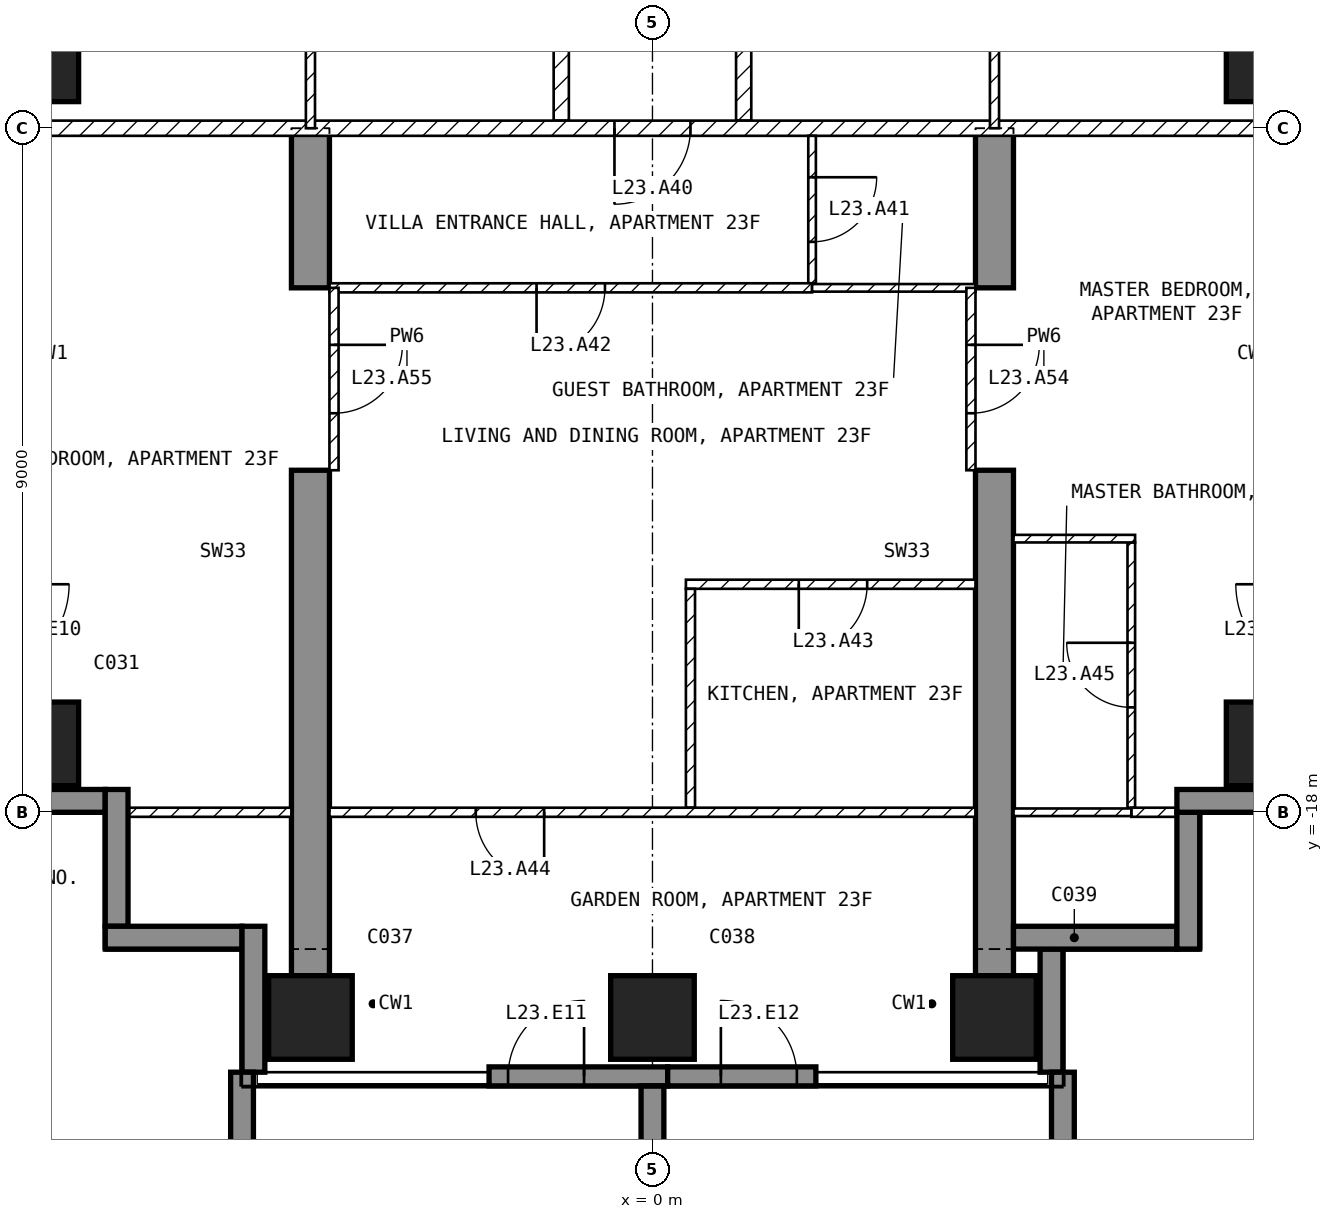
"""IFC4 building model, lengths in metres.
Left out: names, types, materials, properties, quantities, classifications, styles, units other than length and angle.
Written with IfcOpenShell. Run it as: python <this file> out.ifc"""

import sys

from ifc_helpers import new_model, si_unit, direction, frame, frame_2d, origin, origin_2d, place, context, subcontext, project, spatial, polyline, rectangle, outline, extrude, element, fill, save


model = new_model("IFC4")
c1 = context("Model", 3, precision=1e-05, world=origin(), true_north=direction((0.0, 1.0)))
c2 = subcontext(c1, "Body", "Model", "MODEL_VIEW")
j1 = project(units=[si_unit("LENGTHUNIT", "METRE"), si_unit("PLANEANGLEUNIT", "RADIAN")], contexts=[c1])
p1 = place(None, origin())
s1 = spatial("IfcSite", under=j1, at=p1, CompositionType="ELEMENT")
p2 = place(p1, origin())
s2 = spatial("IfcBuilding", under=s1, at=p2, CompositionType="ELEMENT")
p3 = place(p2, frame((0.0, 0.0, 102.4)))
s3 = spatial("IfcBuildingStorey", under=s2, at=p3, CompositionType="ELEMENT", Elevation=102.4)
for number, where, z_axis, x_axis in (
    (1, (-8.1, -17.1, -0.25), (0.0, 0.0, 1.0), (1.0, 0.0, 0.0)),
    (2, (-8.1, -8.1, -0.25), (0.0, 0.0, 1.0), (1.0, 0.0, 0.0)),
    (3, (-4.5, -20.7, -0.25), (0.0, 0.0, 1.0), (1.0, 0.0, 0.0)),
    (4, (0.0, -20.7, -0.25), (0.0, 0.0, 1.0), (1.0, 0.0, 0.0)),
    (5, (4.5, -20.7, -0.25), (0.0, 0.0, 1.0), (1.0, 0.0, 0.0)),
    (6, (8.1, -17.1, -0.25), (0.0, 0.0, 1.0), (1.0, 0.0, 0.0)),
    (7, (8.1, -8.1, -0.25), (0.0, 0.0, 1.0), (1.0, 0.0, 0.0)),
):
    element("IfcColumn", number, at=place(p3, frame(where, z_axis=z_axis, x_axis=x_axis)), inside=s3, PredefinedType="COLUMN", context=c2, shape_type="SweptSolid", body=[
        extrude(rectangle(XDim=1.1, YDim=1.1, at=origin_2d()), origin(), (0.0, 0.0, 1.0), 3.5),
    ])
for number, where, z_axis, x_axis in (
    (8, (-4.75, -20.15, -0.25), (1.0, 0.0, 0.0), (0.0, 1.0, 0.0)),
    (9, (4.25, -20.15, -0.25), (1.0, 0.0, 0.0), (0.0, 1.0, 0.0)),
):
    element("IfcWall", number, at=place(p3, frame(where, z_axis=z_axis, x_axis=x_axis)), inside=s3, PredefinedType="SHEAR", context=c2, shape_type="SweptSolid", body=[
        extrude(outline(polyline([(0.0, 0.0), (6.65, 0.0), (6.65, 2.65), (9.05, 2.65), (9.05, 0.0), (11.15, 0.0), (11.15, 3.5), (0.0, 3.5), (0.0, 0.0)])), origin(), (0.0, 0.0, 1.0), 0.5),
    ])
p4 = place(p3, frame((-2.15, -21.475, 0.0), z_axis=(0.0, 0.0, 1.0), x_axis=(1.0, 0.0, 0.0)))
e10 = element("IfcWall", 10, at=p4, inside=s3, PredefinedType="SOLIDWALL", context=c2, shape_type="SweptSolid", body=[
    extrude(rectangle(XDim=2.35, YDim=0.25, at=frame_2d((1.175, 0.0))), origin(), (0.0, 0.0, 1.0), 3.25),
])
p5 = place(p4, frame((0.25, 0.0, 0.0)))
e11 = element("IfcOpeningElement", 11, at=p5, cuts=e10, PredefinedType="OPENING", context=c2, shape_type="SweptSolid", body=[
    extrude(rectangle(XDim=1.0, YDim=2.4, at=frame_2d((0.5, 1.2))), frame((0.0, 0.135, 0.0), z_axis=(0.0, -1.0, 0.0), x_axis=(1.0, 0.0, 0.0)), (0.0, 0.0, 1.0), 0.27),
])
p6 = place(p3, frame((0.2, -21.475, 0.0), z_axis=(0.0, 0.0, 1.0), x_axis=(1.0, 0.0, 0.0)))
e12 = element("IfcWall", 12, at=p6, inside=s3, PredefinedType="SOLIDWALL", context=c2, shape_type="SweptSolid", body=[
    extrude(rectangle(XDim=1.95, YDim=0.25, at=frame_2d((0.975, 0.0))), origin(), (0.0, 0.0, 1.0), 3.25),
])
p7 = place(p6, frame((0.7, 0.0, 0.0)))
e13 = element("IfcOpeningElement", 13, at=p7, cuts=e12, PredefinedType="OPENING", context=c2, shape_type="SweptSolid", body=[
    extrude(rectangle(XDim=1.0, YDim=2.4, at=frame_2d((0.5, 1.2))), frame((0.0, 0.135, 0.0), z_axis=(0.0, -1.0, 0.0), x_axis=(1.0, 0.0, 0.0)), (0.0, 0.0, 1.0), 0.27),
])
p8 = place(p3, frame((5.25, -21.42, 0.0), z_axis=(0.0, 0.0, 1.0), x_axis=(0.0, 1.0, 0.0)))
e14 = element("IfcWall", 14, at=p8, inside=s3, PredefinedType="SOLIDWALL", context=c2, shape_type="SweptSolid", body=[
    extrude(rectangle(XDim=1.62, YDim=0.3, at=frame_2d((0.81, 0.0))), origin(), (0.0, 0.0, 1.0), 3.25),
])
p9 = place(p3, frame((4.75, -19.65, 0.0), z_axis=(0.0, 0.0, 1.0), x_axis=(1.0, 0.0, 0.0)))
e15 = element("IfcWall", 15, at=p9, inside=s3, PredefinedType="SOLIDWALL", context=c2, shape_type="SweptSolid", body=[
    extrude(rectangle(XDim=2.15, YDim=0.3, at=frame_2d((1.075, 0.0))), origin(), (0.0, 0.0, 1.0), 3.25),
])
p10 = place(p3, frame((7.05, -19.8, 0.0), z_axis=(0.0, 0.0, 1.0), x_axis=(0.0, 1.0, 0.0)))
e16 = element("IfcWall", 16, at=p10, inside=s3, PredefinedType="SOLIDWALL", context=c2, shape_type="SweptSolid", body=[
    extrude(rectangle(XDim=1.8, YDim=0.3, at=frame_2d((0.9, 0.0))), origin(), (0.0, 0.0, 1.0), 3.25),
])
p11 = place(p3, frame((6.9, -17.85, 0.0), z_axis=(0.0, 0.0, 1.0), x_axis=(1.0, 0.0, 0.0)))
e17 = element("IfcWall", 17, at=p11, inside=s3, PredefinedType="SOLIDWALL", context=c2, shape_type="SweptSolid", body=[
    extrude(rectangle(XDim=1.85, YDim=0.3, at=frame_2d((0.925, 0.0))), origin(), (0.0, 0.0, 1.0), 3.25),
])
p12 = place(p3, frame((-8.75, -17.85, 0.0), z_axis=(0.0, 0.0, 1.0), x_axis=(1.0, 0.0, 0.0)))
e18 = element("IfcWall", 18, at=p12, inside=s3, PredefinedType="SOLIDWALL", context=c2, shape_type="SweptSolid", body=[
    extrude(rectangle(XDim=1.55, YDim=0.3, at=frame_2d((0.775, 0.0))), origin(), (0.0, 0.0, 1.0), 3.25),
])
for number, where, z_axis, x_axis in (
    (19, (-7.05, -17.7, 0.0), (0.0, 0.0, 1.0), (0.0, -1.0, 0.0)),
    (20, (-7.2, -19.65, 0.0), (0.0, 0.0, 1.0), (1.0, 0.0, 0.0)),
):
    element("IfcWall", number, at=place(p3, frame(where, z_axis=z_axis, x_axis=x_axis)), inside=s3, PredefinedType="SOLIDWALL", context=c2, shape_type="SweptSolid", body=[
        extrude(rectangle(XDim=1.8, YDim=0.3, at=frame_2d((0.9, 0.0))), origin(), (0.0, 0.0, 1.0), 3.25),
    ])
p13 = place(p3, frame((-5.25, -19.5, 0.0), z_axis=(0.0, 0.0, 1.0), x_axis=(0.0, -1.0, 0.0)))
e21 = element("IfcWall", 21, at=p13, inside=s3, PredefinedType="SOLIDWALL", context=c2, shape_type="SweptSolid", body=[
    extrude(rectangle(XDim=1.92, YDim=0.3, at=frame_2d((0.96, 0.0))), origin(), (0.0, 0.0, 1.0), 3.25),
])
p14 = place(p3, frame((-5.4, -21.42, 0.0), z_axis=(0.0, 0.0, 1.0), x_axis=(0.0, -1.0, 0.0)))
e22 = element("IfcWall", 22, at=p14, inside=s3, PredefinedType="SOLIDWALL", context=c2, shape_type="SweptSolid", body=[
    extrude(rectangle(XDim=2.88, YDim=0.3, at=frame_2d((1.44, 0.0))), origin(), (0.0, 0.0, 1.0), 3.25),
])
p15 = place(p3, frame((0.0, -21.6, 0.0), z_axis=(0.0, 0.0, 1.0), x_axis=(0.0, -1.0, 0.0)))
e23 = element("IfcWall", 23, at=p15, inside=s3, PredefinedType="SOLIDWALL", context=c2, shape_type="SweptSolid", body=[
    extrude(rectangle(XDim=2.7, YDim=0.3, at=frame_2d((1.35, 0.0))), origin(), (0.0, 0.0, 1.0), 3.25),
])
p16 = place(p3, frame((5.4, -21.42, 0.0), z_axis=(0.0, 0.0, 1.0), x_axis=(0.0, -1.0, 0.0)))
e24 = element("IfcWall", 24, at=p16, inside=s3, PredefinedType="SOLIDWALL", context=c2, shape_type="SweptSolid", body=[
    extrude(rectangle(XDim=2.88, YDim=0.3, at=frame_2d((1.44, 0.0))), origin(), (0.0, 0.0, 1.0), 3.25),
])
for number, where, z_axis, x_axis in (
    (25, (1.2, -4.6, 0.0), (0.0, 0.0, 1.0), (0.0, -1.0, 0.0)),
    (26, (-1.2, -8.9, 0.0), (0.0, 0.0, 1.0), (0.0, 1.0, 0.0)),
):
    element("IfcWall", number, at=place(p3, frame(where, z_axis=z_axis, x_axis=x_axis)), inside=s3, PredefinedType="PARTITIONING", context=c2, shape_type="SweptSolid", body=[
        extrude(rectangle(XDim=4.3, YDim=0.2, at=frame_2d((2.15, 0.0))), origin(), (0.0, 0.0, 1.0), 3.25),
    ])
p17 = place(p3, frame((8.92, -9.0, 0.0), z_axis=(0.0, 0.0, 1.0), x_axis=(-1.0, 0.0, 0.0)))
e27 = element("IfcWall", 27, at=p17, inside=s3, PredefinedType="PARTITIONING", context=c2, shape_type="SweptSolid", body=[
    extrude(rectangle(XDim=17.84, YDim=0.2, at=frame_2d((8.92, 0.0))), origin(), (0.0, 0.0, 1.0), 3.25),
])
p18 = place(p17, frame((8.42, 0.0, 0.0)))
e28 = element("IfcOpeningElement", 28, at=p18, cuts=e27, PredefinedType="OPENING", context=c2, shape_type="SweptSolid", body=[
    extrude(rectangle(XDim=1.0, YDim=2.1, at=frame_2d((0.5, 1.05))), frame((0.0, 0.11, 0.0), z_axis=(0.0, -1.0, 0.0), x_axis=(1.0, 0.0, 0.0)), (0.0, 0.0, 1.0), 0.22),
])
p19 = place(p3, frame((4.5, -9.0, 0.0), z_axis=(0.0, 0.0, 1.0), x_axis=(0.0, 1.0, 0.0)))
e29 = element("IfcWall", 29, at=p19, inside=s3, PredefinedType="PARTITIONING", context=c2, shape_type="SweptSolid", body=[
    extrude(rectangle(XDim=4.5, YDim=0.12, at=frame_2d((2.25, 0.0))), origin(), (0.0, 0.0, 1.0), 3.25),
])
p20 = place(p19, frame((1.8, 0.0, 0.0)))
e30 = element("IfcOpeningElement", 30, at=p20, cuts=e29, PredefinedType="OPENING", context=c2, shape_type="SweptSolid", body=[
    extrude(rectangle(XDim=0.9, YDim=2.1, at=frame_2d((0.45, 1.05))), frame((0.0, 0.07, 0.0), z_axis=(0.0, -1.0, 0.0), x_axis=(1.0, 0.0, 0.0)), (0.0, 0.0, 1.0), 0.14),
])
p21 = place(p3, frame((-4.5, -4.5, 0.0), z_axis=(0.0, 0.0, 1.0), x_axis=(0.0, -1.0, 0.0)))
e31 = element("IfcWall", 31, at=p21, inside=s3, PredefinedType="PARTITIONING", context=c2, shape_type="SweptSolid", body=[
    extrude(rectangle(XDim=4.5, YDim=0.12, at=frame_2d((2.25, 0.0))), origin(), (0.0, 0.0, 1.0), 3.25),
])
p22 = place(p21, frame((1.8, 0.0, 0.0)))
e32 = element("IfcOpeningElement", 32, at=p22, cuts=e31, PredefinedType="OPENING", context=c2, shape_type="SweptSolid", body=[
    extrude(rectangle(XDim=0.9, YDim=2.1, at=frame_2d((0.45, 1.05))), frame((0.0, 0.07, 0.0), z_axis=(0.0, -1.0, 0.0), x_axis=(1.0, 0.0, 0.0)), (0.0, 0.0, 1.0), 0.14),
])
p23 = place(p3, frame((2.1, -9.1, 0.0), z_axis=(0.0, 0.0, 1.0), x_axis=(0.0, -1.0, 0.0)))
e33 = element("IfcWall", 33, at=p23, inside=s3, PredefinedType="PARTITIONING", context=c2, shape_type="SweptSolid", body=[
    extrude(rectangle(XDim=1.94, YDim=0.1, at=frame_2d((0.97, 0.0))), origin(), (0.0, 0.0, 1.0), 3.25),
])
p24 = place(p23, frame((0.545, 0.0, 0.0)))
e34 = element("IfcOpeningElement", 34, at=p24, cuts=e33, PredefinedType="OPENING", context=c2, shape_type="SweptSolid", body=[
    extrude(rectangle(XDim=0.85, YDim=2.1, at=frame_2d((0.425, 1.05))), frame((0.0, 0.06, 0.0), z_axis=(0.0, -1.0, 0.0), x_axis=(1.0, 0.0, 0.0)), (0.0, 0.0, 1.0), 0.12),
])
p25 = place(p3, frame((2.1, -11.1, 0.0), z_axis=(0.0, 0.0, 1.0), x_axis=(-1.0, 0.0, 0.0)))
e35 = element("IfcWall", 35, at=p25, inside=s3, PredefinedType="PARTITIONING", context=c2, shape_type="SweptSolid", body=[
    extrude(rectangle(XDim=6.35, YDim=0.12, at=frame_2d((3.175, 0.0))), origin(), (0.0, 0.0, 1.0), 3.25),
])
p26 = place(p25, frame((2.725, 0.0, 0.0)))
e36 = element("IfcOpeningElement", 36, at=p26, cuts=e35, PredefinedType="OPENING", context=c2, shape_type="SweptSolid", body=[
    extrude(rectangle(XDim=0.9, YDim=2.1, at=frame_2d((0.45, 1.05))), frame((0.0, 0.07, 0.0), z_axis=(0.0, -1.0, 0.0), x_axis=(1.0, 0.0, 0.0)), (0.0, 0.0, 1.0), 0.14),
])
p27 = place(p3, frame((4.25, -11.1, 0.0), z_axis=(0.0, 0.0, 1.0), x_axis=(-1.0, 0.0, 0.0)))
e37 = element("IfcWall", 37, at=p27, inside=s3, PredefinedType="PARTITIONING", context=c2, shape_type="SweptSolid", body=[
    extrude(rectangle(XDim=2.15, YDim=0.1, at=frame_2d((1.075, 0.0))), origin(), (0.0, 0.0, 1.0), 3.25),
])
p28 = place(p3, frame((4.25, -15.0, 0.0), z_axis=(0.0, 0.0, 1.0), x_axis=(-1.0, 0.0, 0.0)))
e38 = element("IfcWall", 38, at=p28, inside=s3, PredefinedType="PARTITIONING", context=c2, shape_type="SweptSolid", body=[
    extrude(rectangle(XDim=3.81, YDim=0.12, at=frame_2d((1.905, 0.0))), origin(), (0.0, 0.0, 1.0), 3.25),
])
p29 = place(p28, frame((1.425, 0.0, 0.0)))
e39 = element("IfcOpeningElement", 39, at=p29, cuts=e38, PredefinedType="OPENING", context=c2, shape_type="SweptSolid", body=[
    extrude(rectangle(XDim=0.9, YDim=2.1, at=frame_2d((0.45, 1.05))), frame((0.0, 0.07, 0.0), z_axis=(0.0, -1.0, 0.0), x_axis=(1.0, 0.0, 0.0)), (0.0, 0.0, 1.0), 0.14),
])
p30 = place(p3, frame((0.5, -15.06, 0.0), z_axis=(0.0, 0.0, 1.0), x_axis=(0.0, -1.0, 0.0)))
e40 = element("IfcWall", 40, at=p30, inside=s3, PredefinedType="PARTITIONING", context=c2, shape_type="SweptSolid", body=[
    extrude(rectangle(XDim=2.88, YDim=0.12, at=frame_2d((1.44, 0.0))), origin(), (0.0, 0.0, 1.0), 3.25),
])
p31 = place(p3, frame((4.25, -18.0, 0.0), z_axis=(0.0, 0.0, 1.0), x_axis=(-1.0, 0.0, 0.0)))
e41 = element("IfcWall", 41, at=p31, inside=s3, PredefinedType="PARTITIONING", context=c2, shape_type="SweptSolid", body=[
    extrude(rectangle(XDim=8.5, YDim=0.12, at=frame_2d((4.25, 0.0))), origin(), (0.0, 0.0, 1.0), 3.25),
])
p32 = place(p31, frame((5.675, 0.0, 0.0)))
e42 = element("IfcOpeningElement", 42, at=p32, cuts=e41, PredefinedType="OPENING", context=c2, shape_type="SweptSolid", body=[
    extrude(rectangle(XDim=0.9, YDim=2.1, at=frame_2d((0.45, 1.05))), frame((0.0, 0.07, 0.0), z_axis=(0.0, -1.0, 0.0), x_axis=(1.0, 0.0, 0.0)), (0.0, 0.0, 1.0), 0.14),
])
p33 = place(p3, frame((6.3, -17.94, 0.0), z_axis=(0.0, 0.0, 1.0), x_axis=(0.0, 1.0, 0.0)))
e43 = element("IfcWall", 43, at=p33, inside=s3, PredefinedType="PARTITIONING", context=c2, shape_type="SweptSolid", body=[
    extrude(rectangle(XDim=3.49, YDim=0.1, at=frame_2d((1.745, 0.0))), origin(), (0.0, 0.0, 1.0), 3.25),
])
p34 = place(p33, frame((1.32, 0.0, 0.0)))
e44 = element("IfcOpeningElement", 44, at=p34, cuts=e43, PredefinedType="OPENING", context=c2, shape_type="SweptSolid", body=[
    extrude(rectangle(XDim=0.85, YDim=2.1, at=frame_2d((0.425, 1.05))), frame((0.0, 0.06, 0.0), z_axis=(0.0, -1.0, 0.0), x_axis=(1.0, 0.0, 0.0)), (0.0, 0.0, 1.0), 0.12),
])
p35 = place(p3, frame((6.35, -14.4, 0.0), z_axis=(0.0, 0.0, 1.0), x_axis=(-1.0, 0.0, 0.0)))
e45 = element("IfcWall", 45, at=p35, inside=s3, PredefinedType="PARTITIONING", context=c2, shape_type="SweptSolid", body=[
    extrude(rectangle(XDim=1.6, YDim=0.1, at=frame_2d((0.8, 0.0))), origin(), (0.0, 0.0, 1.0), 3.25),
])
p36 = place(p3, frame((7.12, -18.0, 0.0), z_axis=(0.0, 0.0, 1.0), x_axis=(-1.0, 0.0, 0.0)))
e46 = element("IfcWall", 46, at=p36, inside=s3, PredefinedType="PARTITIONING", context=c2, shape_type="SweptSolid", body=[
    extrude(rectangle(XDim=0.82, YDim=0.12, at=frame_2d((0.41, 0.0))), origin(), (0.0, 0.0, 1.0), 3.25),
])
p37 = place(p3, frame((6.3, -18.0, 0.0), z_axis=(0.0, 0.0, 1.0), x_axis=(-1.0, 0.0, 0.0)))
e47 = element("IfcWall", 47, at=p37, inside=s3, PredefinedType="PARTITIONING", context=c2, shape_type="SweptSolid", body=[
    extrude(rectangle(XDim=1.55, YDim=0.1, at=frame_2d((0.775, 0.0))), origin(), (0.0, 0.0, 1.0), 3.25),
])
p38 = place(p3, frame((-4.75, -18.0, 0.0), z_axis=(0.0, 0.0, 1.0), x_axis=(-1.0, 0.0, 0.0)))
e48 = element("IfcWall", 48, at=p38, inside=s3, PredefinedType="PARTITIONING", context=c2, shape_type="SweptSolid", body=[
    extrude(rectangle(XDim=2.37, YDim=0.12, at=frame_2d((1.185, 0.0))), origin(), (0.0, 0.0, 1.0), 3.25),
])
p39 = place(p3, frame((4.19, -11.1, 0.0), z_axis=(0.0, 0.0, 1.0), x_axis=(0.0, -1.0, 0.0)))
e49 = element("IfcWall", 49, at=p39, inside=s3, PredefinedType="PARTITIONING", context=c2, shape_type="SweptSolid", body=[
    extrude(rectangle(XDim=2.4, YDim=0.12, at=frame_2d((1.2, 0.0))), origin(), (0.0, 0.0, 1.0), 2.4),
])
p40 = place(p39, frame((0.75, 0.0, 0.0)))
e50 = element("IfcOpeningElement", 50, at=p40, cuts=e49, PredefinedType="OPENING", context=c2, shape_type="SweptSolid", body=[
    extrude(rectangle(XDim=0.9, YDim=2.1, at=frame_2d((0.45, 1.05))), frame((0.0, 0.07, 0.0), z_axis=(0.0, -1.0, 0.0), x_axis=(1.0, 0.0, 0.0)), (0.0, 0.0, 1.0), 0.14),
])
p41 = place(p3, frame((-4.19, -11.1, 0.0), z_axis=(0.0, 0.0, 1.0), x_axis=(0.0, -1.0, 0.0)))
e51 = element("IfcWall", 51, at=p41, inside=s3, PredefinedType="PARTITIONING", context=c2, shape_type="SweptSolid", body=[
    extrude(rectangle(XDim=2.4, YDim=0.12, at=frame_2d((1.2, 0.0))), origin(), (0.0, 0.0, 1.0), 2.4),
])
p42 = place(p41, frame((0.75, 0.0, 0.0)))
e52 = element("IfcOpeningElement", 52, at=p42, cuts=e51, PredefinedType="OPENING", context=c2, shape_type="SweptSolid", body=[
    extrude(rectangle(XDim=0.9, YDim=2.1, at=frame_2d((0.45, 1.05))), frame((0.0, 0.07, 0.0), z_axis=(0.0, -1.0, 0.0), x_axis=(1.0, 0.0, 0.0)), (0.0, 0.0, 1.0), 0.14),
])
p43 = place(p5, origin())
e53 = element("IfcDoor", 53, at=p43, inside=s3, OperationType="SINGLE_SWING_RIGHT", PredefinedType="DOOR", context=c2, shape_type="SweptSolid", body=[
    extrude(rectangle(XDim=1.0, YDim=2.4, at=frame_2d((0.5, 1.2))), frame((0.0, 0.025, 0.0), z_axis=(0.0, -1.0, 0.0), x_axis=(1.0, 0.0, 0.0)), (0.0, 0.0, 1.0), 0.05),
])
fill(e11, e53)
p44 = place(p7, origin())
e54 = element("IfcDoor", 54, at=p44, inside=s3, OperationType="SINGLE_SWING_LEFT", PredefinedType="DOOR", context=c2, shape_type="SweptSolid", body=[
    extrude(rectangle(XDim=1.0, YDim=2.4, at=frame_2d((0.5, 1.2))), frame((0.0, 0.025, 0.0), z_axis=(0.0, -1.0, 0.0), x_axis=(1.0, 0.0, 0.0)), (0.0, 0.0, 1.0), 0.05),
])
fill(e13, e54)
p45 = place(p18, origin())
e55 = element("IfcDoor", 55, at=p45, inside=s3, OperationType="SINGLE_SWING_RIGHT", PredefinedType="DOOR", context=c2, shape_type="SweptSolid", body=[
    extrude(rectangle(XDim=1.0, YDim=2.1, at=frame_2d((0.5, 1.05))), frame((0.0, 0.025, 0.0), z_axis=(0.0, -1.0, 0.0), x_axis=(1.0, 0.0, 0.0)), (0.0, 0.0, 1.0), 0.05),
])
fill(e28, e55)
p46 = place(p24, origin())
e56 = element("IfcDoor", 56, at=p46, inside=s3, OperationType="SINGLE_SWING_LEFT", PredefinedType="DOOR", context=c2, shape_type="SweptSolid", body=[
    extrude(rectangle(XDim=0.85, YDim=2.1, at=frame_2d((0.425, 1.05))), frame((0.0, 0.025, 0.0), z_axis=(0.0, -1.0, 0.0), x_axis=(1.0, 0.0, 0.0)), (0.0, 0.0, 1.0), 0.05),
])
fill(e34, e56)
p47 = place(p26, origin())
e57 = element("IfcDoor", 57, at=p47, inside=s3, OperationType="SINGLE_SWING_RIGHT", PredefinedType="DOOR", context=c2, shape_type="SweptSolid", body=[
    extrude(rectangle(XDim=0.9, YDim=2.1, at=frame_2d((0.45, 1.05))), frame((0.0, 0.025, 0.0), z_axis=(0.0, -1.0, 0.0), x_axis=(1.0, 0.0, 0.0)), (0.0, 0.0, 1.0), 0.05),
])
fill(e36, e57)
p48 = place(p29, origin())
e58 = element("IfcDoor", 58, at=p48, inside=s3, OperationType="SINGLE_SWING_RIGHT", PredefinedType="DOOR", context=c2, shape_type="SweptSolid", body=[
    extrude(rectangle(XDim=0.9, YDim=2.1, at=frame_2d((0.45, 1.05))), frame((0.0, 0.025, 0.0), z_axis=(0.0, -1.0, 0.0), x_axis=(1.0, 0.0, 0.0)), (0.0, 0.0, 1.0), 0.05),
])
fill(e39, e58)
p49 = place(p32, origin())
e59 = element("IfcDoor", 59, at=p49, inside=s3, OperationType="SINGLE_SWING_LEFT", PredefinedType="DOOR", context=c2, shape_type="SweptSolid", body=[
    extrude(rectangle(XDim=0.9, YDim=2.1, at=frame_2d((0.45, 1.05))), frame((0.0, 0.025, 0.0), z_axis=(0.0, -1.0, 0.0), x_axis=(1.0, 0.0, 0.0)), (0.0, 0.0, 1.0), 0.05),
])
fill(e42, e59)
p50 = place(p34, origin())
e60 = element("IfcDoor", 60, at=p50, inside=s3, OperationType="SINGLE_SWING_RIGHT", PredefinedType="DOOR", context=c2, shape_type="SweptSolid", body=[
    extrude(rectangle(XDim=0.85, YDim=2.1, at=frame_2d((0.425, 1.05))), frame((0.0, 0.025, 0.0), z_axis=(0.0, -1.0, 0.0), x_axis=(1.0, 0.0, 0.0)), (0.0, 0.0, 1.0), 0.05),
])
fill(e44, e60)
p51 = place(p40, origin())
e61 = element("IfcDoor", 61, at=p51, inside=s3, OperationType="SINGLE_SWING_LEFT", PredefinedType="DOOR", context=c2, shape_type="SweptSolid", body=[
    extrude(rectangle(XDim=0.9, YDim=2.1, at=frame_2d((0.45, 1.05))), frame((0.0, 0.025, 0.0), z_axis=(0.0, -1.0, 0.0), x_axis=(1.0, 0.0, 0.0)), (0.0, 0.0, 1.0), 0.05),
])
fill(e50, e61)
p52 = place(p42, origin())
e62 = element("IfcDoor", 62, at=p52, inside=s3, OperationType="SINGLE_SWING_LEFT", PredefinedType="DOOR", context=c2, shape_type="SweptSolid", body=[
    extrude(rectangle(XDim=0.9, YDim=2.1, at=frame_2d((0.45, 1.05))), frame((0.0, 0.025, 0.0), z_axis=(0.0, -1.0, 0.0), x_axis=(1.0, 0.0, 0.0)), (0.0, 0.0, 1.0), 0.05),
])
fill(e52, e62)
save(model, sys.argv[1])
